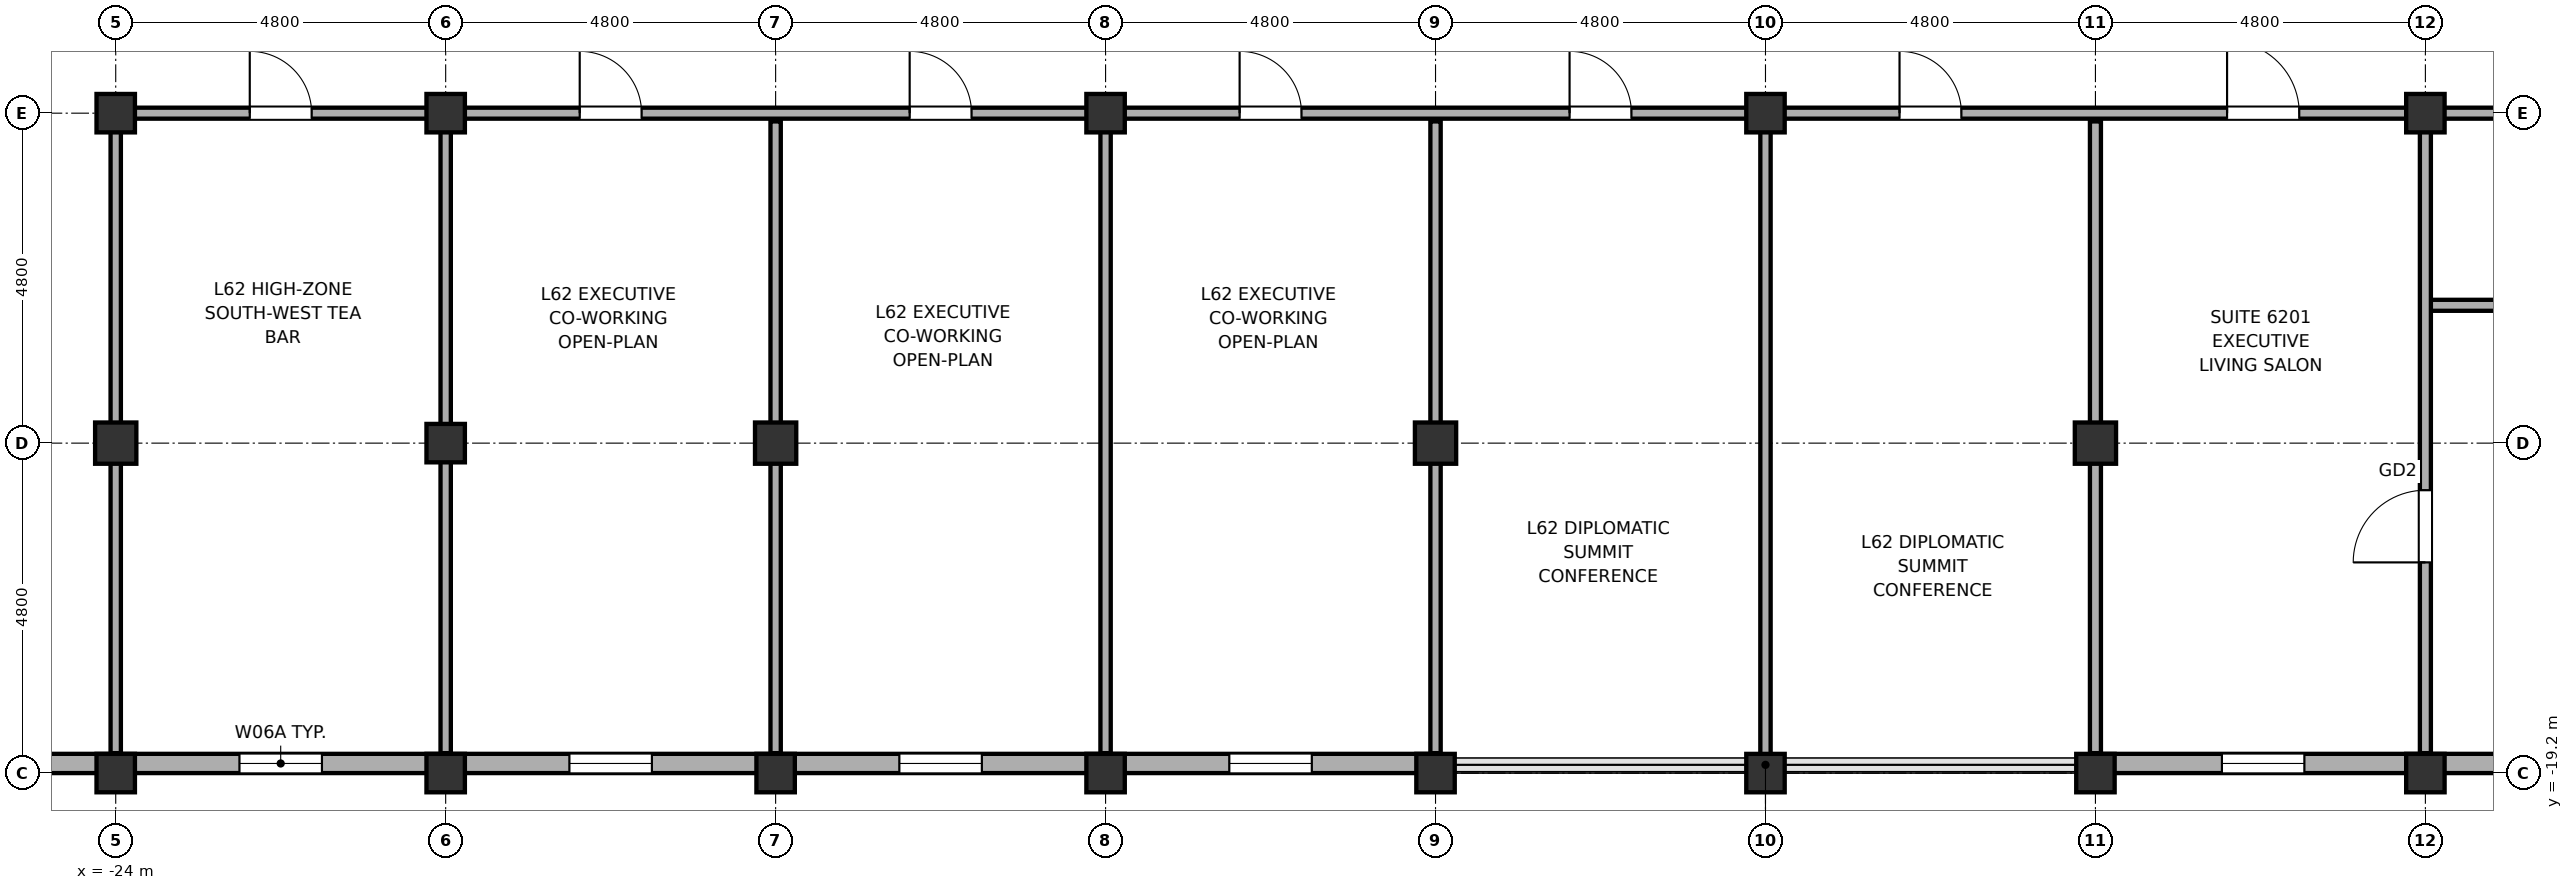
"""IFC4 building model, lengths in metres.
Left out: names, types, materials, properties, quantities, classifications, styles, units other than length and angle.
Written with IfcOpenShell. Run it as: python <this file> out.ifc"""

import sys

from ifc_helpers import new_model, si_unit, direction, frame, frame_2d, origin, origin_2d, place, context, subcontext, project, spatial, rectangle, hollow_rectangle, hollow_circle, extrude, element, fill, save


model = new_model("IFC4")
c1 = context("Model", 3, precision=1e-05, world=origin(), true_north=direction((0.0, 1.0)))
c2 = subcontext(c1, "Body", "Model", "MODEL_VIEW")
j1 = project(units=[si_unit("LENGTHUNIT", "METRE"), si_unit("PLANEANGLEUNIT", "RADIAN")], contexts=[c1])
p1 = place(None, origin())
s1 = spatial("IfcSite", under=j1, at=p1, CompositionType="ELEMENT")
p2 = place(p1, origin())
s2 = spatial("IfcBuilding", under=s1, at=p2, CompositionType="ELEMENT")
p3 = place(p2, frame((0.0, 0.0, 249.25)))
s3 = spatial("IfcBuildingStorey", under=s2, at=p3, CompositionType="ELEMENT", Elevation=249.25)
p4 = place(p3, frame((-24.0, -19.2, 0.0), z_axis=(0.0, 0.0, 1.0), x_axis=(1.0, 0.0, 0.0)))
e1 = element("IfcColumn", 1, at=p4, inside=s3, PredefinedType="COLUMN", context=c2, shape_type="SweptSolid", body=[
    extrude(hollow_circle(Radius=0.28, WallThickness=0.025, at=origin_2d()), origin(), (0.0, 0.0, 1.0), 3.85),
])
p5 = place(p3, frame((-24.0, -14.4, 0.0), z_axis=(0.0, 0.0, 1.0), x_axis=(1.0, 0.0, 0.0)))
e2 = element("IfcColumn", 2, at=p5, inside=s3, PredefinedType="COLUMN", context=c2, shape_type="SweptSolid", body=[
    extrude(hollow_rectangle(XDim=0.6, YDim=0.6, WallThickness=0.028, at=origin_2d()), origin(), (0.0, 0.0, 1.0), 3.85),
])
for number, where, z_axis, x_axis in (
    (3, (-24.0, -9.6, 0.0), (0.0, 0.0, 1.0), (1.0, 0.0, 0.0)),
    (4, (-19.2, -19.2, 0.0), (0.0, 0.0, 1.0), (1.0, 0.0, 0.0)),
    (5, (-19.2, -14.4, 0.0), (0.0, 0.0, 1.0), (1.0, 0.0, 0.0)),
    (6, (-19.2, -9.6, 0.0), (0.0, 0.0, 1.0), (1.0, 0.0, 0.0)),
    (7, (-14.4, -19.2, 0.0), (0.0, 0.0, 1.0), (1.0, 0.0, 0.0)),
):
    element("IfcColumn", number, at=place(p3, frame(where, z_axis=z_axis, x_axis=x_axis)), inside=s3, PredefinedType="COLUMN", context=c2, shape_type="SweptSolid", body=[
        extrude(hollow_circle(Radius=0.28, WallThickness=0.025, at=origin_2d()), origin(), (0.0, 0.0, 1.0), 3.85),
    ])
p6 = place(p3, frame((-14.4, -14.4, 0.0), z_axis=(0.0, 0.0, 1.0), x_axis=(1.0, 0.0, 0.0)))
e8 = element("IfcColumn", 8, at=p6, inside=s3, PredefinedType="COLUMN", context=c2, shape_type="SweptSolid", body=[
    extrude(hollow_rectangle(XDim=0.6, YDim=0.6, WallThickness=0.028, at=origin_2d()), origin(), (0.0, 0.0, 1.0), 3.85),
])
for number, where, z_axis, x_axis in (
    (9, (-9.6, -19.2, 0.0), (0.0, 0.0, 1.0), (1.0, 0.0, 0.0)),
    (10, (-9.6, -9.6, 0.0), (0.0, 0.0, 1.0), (1.0, 0.0, 0.0)),
    (11, (-4.8, -19.2, 0.0), (0.0, 0.0, 1.0), (1.0, 0.0, 0.0)),
):
    element("IfcColumn", number, at=place(p3, frame(where, z_axis=z_axis, x_axis=x_axis)), inside=s3, PredefinedType="COLUMN", context=c2, shape_type="SweptSolid", body=[
        extrude(hollow_circle(Radius=0.28, WallThickness=0.025, at=origin_2d()), origin(), (0.0, 0.0, 1.0), 3.85),
    ])
p7 = place(p3, frame((-4.8, -14.4, 0.0), z_axis=(0.0, 0.0, 1.0), x_axis=(1.0, 0.0, 0.0)))
e12 = element("IfcColumn", 12, at=p7, inside=s3, PredefinedType="COLUMN", context=c2, shape_type="SweptSolid", body=[
    extrude(hollow_rectangle(XDim=0.6, YDim=0.6, WallThickness=0.028, at=origin_2d()), origin(), (0.0, 0.0, 1.0), 3.85),
])
for number, where, z_axis, x_axis in (
    (13, (0.0, -19.2, 0.0), (0.0, 0.0, 1.0), (1.0, 0.0, 0.0)),
    (14, (0.0, -9.6, 0.0), (0.0, 0.0, 1.0), (1.0, 0.0, 0.0)),
    (15, (4.8, -19.2, 0.0), (0.0, 0.0, 1.0), (1.0, 0.0, 0.0)),
):
    element("IfcColumn", number, at=place(p3, frame(where, z_axis=z_axis, x_axis=x_axis)), inside=s3, PredefinedType="COLUMN", context=c2, shape_type="SweptSolid", body=[
        extrude(hollow_circle(Radius=0.28, WallThickness=0.025, at=origin_2d()), origin(), (0.0, 0.0, 1.0), 3.85),
    ])
p8 = place(p3, frame((4.8, -14.4, 0.0), z_axis=(0.0, 0.0, 1.0), x_axis=(1.0, 0.0, 0.0)))
e16 = element("IfcColumn", 16, at=p8, inside=s3, PredefinedType="COLUMN", context=c2, shape_type="SweptSolid", body=[
    extrude(hollow_rectangle(XDim=0.6, YDim=0.6, WallThickness=0.028, at=origin_2d()), origin(), (0.0, 0.0, 1.0), 3.85),
])
for number, where, z_axis, x_axis in (
    (17, (9.6, -19.2, 0.0), (0.0, 0.0, 1.0), (1.0, 0.0, 0.0)),
    (18, (9.6, -9.6, 0.0), (0.0, 0.0, 1.0), (1.0, 0.0, 0.0)),
):
    element("IfcColumn", number, at=place(p3, frame(where, z_axis=z_axis, x_axis=x_axis)), inside=s3, PredefinedType="COLUMN", context=c2, shape_type="SweptSolid", body=[
        extrude(hollow_circle(Radius=0.28, WallThickness=0.025, at=origin_2d()), origin(), (0.0, 0.0, 1.0), 3.85),
    ])
p9 = place(p3, frame((-30.0, -19.06, 0.0), z_axis=(0.0, 0.0, 1.0), x_axis=(1.0, 0.0, 0.0)))
e19 = element("IfcWall", 19, at=p9, inside=s3, PredefinedType="SOLIDWALL", context=c2, shape_type="SweptSolid", body=[
    extrude(rectangle(XDim=25.25, YDim=0.28, at=frame_2d((12.625, 0.0))), origin(), (0.0, 0.0, 1.0), 2.27),
])
p10 = place(p9, frame((7.8, 0.0, 0.75)))
e20 = element("IfcOpeningElement", 20, at=p10, cuts=e19, PredefinedType="OPENING", context=c2, shape_type="SweptSolid", body=[
    extrude(rectangle(XDim=1.2, YDim=1.15, at=frame_2d((0.6, 0.575))), frame((0.0, 0.155, 0.0), z_axis=(0.0, -1.0, 0.0), x_axis=(1.0, 0.0, 0.0)), (0.0, 0.0, 1.0), 0.31),
])
p11 = place(p9, frame((12.6, 0.0, 0.75)))
e21 = element("IfcOpeningElement", 21, at=p11, cuts=e19, PredefinedType="OPENING", context=c2, shape_type="SweptSolid", body=[
    extrude(rectangle(XDim=1.2, YDim=1.15, at=frame_2d((0.6, 0.575))), frame((0.0, 0.155, 0.0), z_axis=(0.0, -1.0, 0.0), x_axis=(1.0, 0.0, 0.0)), (0.0, 0.0, 1.0), 0.31),
])
p12 = place(p9, frame((17.4, 0.0, 0.75)))
e22 = element("IfcOpeningElement", 22, at=p12, cuts=e19, PredefinedType="OPENING", context=c2, shape_type="SweptSolid", body=[
    extrude(rectangle(XDim=1.2, YDim=1.15, at=frame_2d((0.6, 0.575))), frame((0.0, 0.155, 0.0), z_axis=(0.0, -1.0, 0.0), x_axis=(1.0, 0.0, 0.0)), (0.0, 0.0, 1.0), 0.31),
])
p13 = place(p9, frame((22.2, 0.0, 0.75)))
e23 = element("IfcOpeningElement", 23, at=p13, cuts=e19, PredefinedType="OPENING", context=c2, shape_type="SweptSolid", body=[
    extrude(rectangle(XDim=1.2, YDim=1.15, at=frame_2d((0.6, 0.575))), frame((0.0, 0.155, 0.0), z_axis=(0.0, -1.0, 0.0), x_axis=(1.0, 0.0, 0.0)), (0.0, 0.0, 1.0), 0.31),
])
p14 = place(p3, frame((4.75, -19.06, 0.0), z_axis=(0.0, 0.0, 1.0), x_axis=(1.0, 0.0, 0.0)))
e24 = element("IfcWall", 24, at=p14, inside=s3, PredefinedType="SOLIDWALL", context=c2, shape_type="SweptSolid", body=[
    extrude(rectangle(XDim=20.45, YDim=0.28, at=frame_2d((10.225, 0.0))), origin(), (0.0, 0.0, 1.0), 2.27),
])
p15 = place(p14, frame((1.89, 0.0, 0.75)))
e25 = element("IfcOpeningElement", 25, at=p15, cuts=e24, PredefinedType="OPENING", context=c2, shape_type="SweptSolid", body=[
    extrude(rectangle(XDim=1.2, YDim=1.15, at=frame_2d((0.6, 0.575))), frame((0.0, 0.155, 0.0), z_axis=(0.0, -1.0, 0.0), x_axis=(1.0, 0.0, 0.0)), (0.0, 0.0, 1.0), 0.31),
])
p16 = place(p14, frame((6.61, 0.0, 0.75)))
e26 = element("IfcOpeningElement", 26, at=p16, cuts=e24, PredefinedType="OPENING", context=c2, shape_type="SweptSolid", body=[
    extrude(rectangle(XDim=1.2, YDim=1.15, at=frame_2d((0.6, 0.575))), frame((0.0, 0.155, 0.0), z_axis=(0.0, -1.0, 0.0), x_axis=(1.0, 0.0, 0.0)), (0.0, 0.0, 1.0), 0.31),
])
p17 = place(p14, frame((11.45, 0.0, 0.75)))
e27 = element("IfcOpeningElement", 27, at=p17, cuts=e24, PredefinedType="OPENING", context=c2, shape_type="SweptSolid", body=[
    extrude(rectangle(XDim=1.2, YDim=1.15, at=frame_2d((0.6, 0.575))), frame((0.0, 0.155, 0.0), z_axis=(0.0, -1.0, 0.0), x_axis=(1.0, 0.0, 0.0)), (0.0, 0.0, 1.0), 0.31),
])
p18 = place(p3, frame((9.6, -12.395, 0.0), z_axis=(0.0, 0.0, 1.0), x_axis=(1.0, 0.0, 0.0)))
e28 = element("IfcWall", 28, at=p18, inside=s3, PredefinedType="PARTITIONING", context=c2, shape_type="SweptSolid", body=[
    extrude(rectangle(XDim=7.01, YDim=0.16, at=frame_2d((3.505, 0.0))), origin(), (0.0, 0.0, 1.0), 3.12),
])
p19 = place(p18, frame((1.93, 0.0, 0.0)))
e29 = element("IfcOpeningElement", 29, at=p19, cuts=e28, PredefinedType="OPENING", context=c2, shape_type="SweptSolid", body=[
    extrude(rectangle(XDim=0.86, YDim=2.1, at=frame_2d((0.43, 1.05))), frame((0.0, 0.095, 0.0), z_axis=(0.0, -1.0, 0.0), x_axis=(1.0, 0.0, 0.0)), (0.0, 0.0, 1.0), 0.19),
])
p20 = place(p3, frame((-23.92, -9.6, 0.0), z_axis=(0.0, 0.0, 1.0), x_axis=(1.0, 0.0, 0.0)))
e30 = element("IfcWall", 30, at=p20, inside=s3, PredefinedType="PARTITIONING", context=c2, shape_type="SweptSolid", body=[
    extrude(rectangle(XDim=47.84, YDim=0.16, at=frame_2d((23.92, 0.0))), origin(), (0.0, 0.0, 1.0), 2.27),
])
p21 = place(p20, frame((1.87, 0.0, 0.0)))
e31 = element("IfcOpeningElement", 31, at=p21, cuts=e30, PredefinedType="OPENING", context=c2, shape_type="SweptSolid", body=[
    extrude(rectangle(XDim=0.9, YDim=2.1, at=frame_2d((0.45, 1.05))), frame((0.0, 0.095, 0.0), z_axis=(0.0, -1.0, 0.0), x_axis=(1.0, 0.0, 0.0)), (0.0, 0.0, 1.0), 0.19),
])
p22 = place(p20, frame((45.07, 0.0, 0.0)))
e32 = element("IfcOpeningElement", 32, at=p22, cuts=e30, PredefinedType="OPENING", context=c2, shape_type="SweptSolid", body=[
    extrude(rectangle(XDim=0.9, YDim=2.1, at=frame_2d((0.45, 1.05))), frame((0.0, 0.095, 0.0), z_axis=(0.0, -1.0, 0.0), x_axis=(1.0, 0.0, 0.0)), (0.0, 0.0, 1.0), 0.19),
])
p23 = place(p20, frame((6.67, 0.0, 0.0)))
e33 = element("IfcOpeningElement", 33, at=p23, cuts=e30, PredefinedType="OPENING", context=c2, shape_type="SweptSolid", body=[
    extrude(rectangle(XDim=0.9, YDim=2.1, at=frame_2d((0.45, 1.05))), frame((0.0, 0.095, 0.0), z_axis=(0.0, -1.0, 0.0), x_axis=(1.0, 0.0, 0.0)), (0.0, 0.0, 1.0), 0.19),
])
p24 = place(p20, frame((11.47, 0.0, 0.0)))
e34 = element("IfcOpeningElement", 34, at=p24, cuts=e30, PredefinedType="OPENING", context=c2, shape_type="SweptSolid", body=[
    extrude(rectangle(XDim=0.9, YDim=2.1, at=frame_2d((0.45, 1.05))), frame((0.0, 0.095, 0.0), z_axis=(0.0, -1.0, 0.0), x_axis=(1.0, 0.0, 0.0)), (0.0, 0.0, 1.0), 0.19),
])
p25 = place(p20, frame((16.27, 0.0, 0.0)))
e35 = element("IfcOpeningElement", 35, at=p25, cuts=e30, PredefinedType="OPENING", context=c2, shape_type="SweptSolid", body=[
    extrude(rectangle(XDim=0.9, YDim=2.1, at=frame_2d((0.45, 1.05))), frame((0.0, 0.095, 0.0), z_axis=(0.0, -1.0, 0.0), x_axis=(1.0, 0.0, 0.0)), (0.0, 0.0, 1.0), 0.19),
])
p26 = place(p20, frame((21.07, 0.0, 0.0)))
e36 = element("IfcOpeningElement", 36, at=p26, cuts=e30, PredefinedType="OPENING", context=c2, shape_type="SweptSolid", body=[
    extrude(rectangle(XDim=0.9, YDim=2.1, at=frame_2d((0.45, 1.05))), frame((0.0, 0.095, 0.0), z_axis=(0.0, -1.0, 0.0), x_axis=(1.0, 0.0, 0.0)), (0.0, 0.0, 1.0), 0.19),
])
p27 = place(p20, frame((25.87, 0.0, 0.0)))
e37 = element("IfcOpeningElement", 37, at=p27, cuts=e30, PredefinedType="OPENING", context=c2, shape_type="SweptSolid", body=[
    extrude(rectangle(XDim=0.9, YDim=2.1, at=frame_2d((0.45, 1.05))), frame((0.0, 0.095, 0.0), z_axis=(0.0, -1.0, 0.0), x_axis=(1.0, 0.0, 0.0)), (0.0, 0.0, 1.0), 0.19),
])
p28 = place(p20, frame((30.635, 0.0, 0.0)))
e38 = element("IfcOpeningElement", 38, at=p28, cuts=e30, PredefinedType="OPENING", context=c2, shape_type="SweptSolid", body=[
    extrude(rectangle(XDim=1.05, YDim=2.2, at=frame_2d((0.525, 1.1))), frame((0.0, 0.095, 0.0), z_axis=(0.0, -1.0, 0.0), x_axis=(1.0, 0.0, 0.0)), (0.0, 0.0, 1.0), 0.19),
])
p29 = place(p20, frame((40.83, 0.0, 0.0)))
e39 = element("IfcOpeningElement", 39, at=p29, cuts=e30, PredefinedType="OPENING", context=c2, shape_type="SweptSolid", body=[
    extrude(rectangle(XDim=0.92, YDim=2.15, at=frame_2d((0.46, 1.075))), frame((0.0, 0.095, 0.0), z_axis=(0.0, -1.0, 0.0), x_axis=(1.0, 0.0, 0.0)), (0.0, 0.0, 1.0), 0.19),
])
for number, where, z_axis, x_axis in (
    (40, (-24.0, -18.91, 0.0), (0.0, 0.0, 1.0), (0.0, 1.0, 0.0)),
    (41, (-19.2, -18.91, 0.0), (0.0, 0.0, 1.0), (0.0, 1.0, 0.0)),
    (42, (-14.4, -18.91, 0.0), (0.0, 0.0, 1.0), (0.0, 1.0, 0.0)),
    (43, (-9.6, -18.91, 0.0), (0.0, 0.0, 1.0), (0.0, 1.0, 0.0)),
    (44, (-4.8, -18.91, 0.0), (0.0, 0.0, 1.0), (0.0, 1.0, 0.0)),
):
    element("IfcWall", number, at=place(p3, frame(where, z_axis=z_axis, x_axis=x_axis)), inside=s3, PredefinedType="PARTITIONING", context=c2, shape_type="SweptSolid", body=[
        extrude(rectangle(XDim=9.19, YDim=0.15, at=frame_2d((4.595, 0.0))), origin(), (0.0, 0.0, 1.0), 2.27),
    ])
p30 = place(p3, frame((0.0, -18.995, 0.0), z_axis=(0.0, 0.0, 1.0), x_axis=(0.0, 1.0, 0.0)))
e45 = element("IfcWall", 45, at=p30, inside=s3, PredefinedType="PARTITIONING", context=c2, shape_type="SweptSolid", body=[
    extrude(rectangle(XDim=9.275, YDim=0.15, at=frame_2d((4.638, 0.0))), origin(), (0.0, 0.0, 1.0), 2.27),
])
p31 = place(p3, frame((4.8, -18.91, 0.0), z_axis=(0.0, 0.0, 1.0), x_axis=(0.0, 1.0, 0.0)))
e46 = element("IfcWall", 46, at=p31, inside=s3, PredefinedType="PARTITIONING", context=c2, shape_type="SweptSolid", body=[
    extrude(rectangle(XDim=9.19, YDim=0.16, at=frame_2d((4.595, 0.0))), origin(), (0.0, 0.0, 1.0), 2.27),
])
p32 = place(p3, frame((9.6, -18.91, 0.0), z_axis=(0.0, 0.0, 1.0), x_axis=(0.0, 1.0, 0.0)))
e47 = element("IfcWall", 47, at=p32, inside=s3, PredefinedType="PARTITIONING", context=c2, shape_type="SweptSolid", body=[
    extrude(rectangle(XDim=9.19, YDim=0.16, at=frame_2d((4.595, 0.0))), origin(), (0.0, 0.0, 1.0), 2.27),
])
p33 = place(p32, frame((2.775, 0.0, 0.0)))
e48 = element("IfcOpeningElement", 48, at=p33, cuts=e47, PredefinedType="OPENING", context=c2, shape_type="SweptSolid", body=[
    extrude(rectangle(XDim=1.05, YDim=2.2, at=frame_2d((0.525, 1.1))), frame((0.0, 0.095, 0.0), z_axis=(0.0, -1.0, 0.0), x_axis=(1.0, 0.0, 0.0)), (0.0, 0.0, 1.0), 0.19),
])
p34 = place(p10, origin())
e49 = element("IfcWindow", 49, at=p34, inside=s3, PartitioningType="SINGLE_PANEL", PredefinedType="WINDOW", context=c2, shape_type="SweptSolid", body=[
    extrude(rectangle(XDim=1.2, YDim=1.15, at=frame_2d((0.6, 0.575))), frame((0.0, 0.03, 0.0), z_axis=(0.0, -1.0, 0.0), x_axis=(1.0, 0.0, 0.0)), (0.0, 0.0, 1.0), 0.06),
])
fill(e20, e49)
p35 = place(p11, origin())
e50 = element("IfcWindow", 50, at=p35, inside=s3, PartitioningType="SINGLE_PANEL", PredefinedType="WINDOW", context=c2, shape_type="SweptSolid", body=[
    extrude(rectangle(XDim=1.2, YDim=1.15, at=frame_2d((0.6, 0.575))), frame((0.0, 0.03, 0.0), z_axis=(0.0, -1.0, 0.0), x_axis=(1.0, 0.0, 0.0)), (0.0, 0.0, 1.0), 0.06),
])
fill(e21, e50)
p36 = place(p12, origin())
e51 = element("IfcWindow", 51, at=p36, inside=s3, PartitioningType="SINGLE_PANEL", PredefinedType="WINDOW", context=c2, shape_type="SweptSolid", body=[
    extrude(rectangle(XDim=1.2, YDim=1.15, at=frame_2d((0.6, 0.575))), frame((0.0, 0.03, 0.0), z_axis=(0.0, -1.0, 0.0), x_axis=(1.0, 0.0, 0.0)), (0.0, 0.0, 1.0), 0.06),
])
fill(e22, e51)
p37 = place(p13, origin())
e52 = element("IfcWindow", 52, at=p37, inside=s3, PartitioningType="SINGLE_PANEL", PredefinedType="WINDOW", context=c2, shape_type="SweptSolid", body=[
    extrude(rectangle(XDim=1.2, YDim=1.15, at=frame_2d((0.6, 0.575))), frame((0.0, 0.03, 0.0), z_axis=(0.0, -1.0, 0.0), x_axis=(1.0, 0.0, 0.0)), (0.0, 0.0, 1.0), 0.06),
])
fill(e23, e52)
p38 = place(p15, origin())
e53 = element("IfcWindow", 53, at=p38, inside=s3, PartitioningType="SINGLE_PANEL", PredefinedType="WINDOW", context=c2, shape_type="SweptSolid", body=[
    extrude(rectangle(XDim=1.2, YDim=1.15, at=frame_2d((0.6, 0.575))), frame((0.0, 0.03, 0.0), z_axis=(0.0, -1.0, 0.0), x_axis=(1.0, 0.0, 0.0)), (0.0, 0.0, 1.0), 0.06),
])
fill(e25, e53)
p39 = place(p21, origin())
e54 = element("IfcDoor", 54, at=p39, inside=s3, OperationType="SINGLE_SWING_RIGHT", PredefinedType="DOOR", context=c2, shape_type="SweptSolid", body=[
    extrude(rectangle(XDim=0.9, YDim=2.1, at=frame_2d((0.45, 1.05))), frame((0.0, 0.025, 0.0), z_axis=(0.0, -1.0, 0.0), x_axis=(1.0, 0.0, 0.0)), (0.0, 0.0, 1.0), 0.05),
])
fill(e31, e54)
p40 = place(p23, origin())
e55 = element("IfcDoor", 55, at=p40, inside=s3, OperationType="SINGLE_SWING_RIGHT", PredefinedType="DOOR", context=c2, shape_type="SweptSolid", body=[
    extrude(rectangle(XDim=0.9, YDim=2.1, at=frame_2d((0.45, 1.05))), frame((0.0, 0.025, 0.0), z_axis=(0.0, -1.0, 0.0), x_axis=(1.0, 0.0, 0.0)), (0.0, 0.0, 1.0), 0.05),
])
fill(e33, e55)
p41 = place(p24, origin())
e56 = element("IfcDoor", 56, at=p41, inside=s3, OperationType="SINGLE_SWING_RIGHT", PredefinedType="DOOR", context=c2, shape_type="SweptSolid", body=[
    extrude(rectangle(XDim=0.9, YDim=2.1, at=frame_2d((0.45, 1.05))), frame((0.0, 0.025, 0.0), z_axis=(0.0, -1.0, 0.0), x_axis=(1.0, 0.0, 0.0)), (0.0, 0.0, 1.0), 0.05),
])
fill(e34, e56)
p42 = place(p25, origin())
e57 = element("IfcDoor", 57, at=p42, inside=s3, OperationType="SINGLE_SWING_LEFT", PredefinedType="DOOR", context=c2, shape_type="SweptSolid", body=[
    extrude(rectangle(XDim=0.9, YDim=2.1, at=frame_2d((0.45, 1.05))), frame((0.0, 0.025, 0.0), z_axis=(0.0, -1.0, 0.0), x_axis=(1.0, 0.0, 0.0)), (0.0, 0.0, 1.0), 0.05),
])
fill(e35, e57)
p43 = place(p26, origin())
e58 = element("IfcDoor", 58, at=p43, inside=s3, OperationType="SINGLE_SWING_LEFT", PredefinedType="DOOR", context=c2, shape_type="SweptSolid", body=[
    extrude(rectangle(XDim=0.9, YDim=2.1, at=frame_2d((0.45, 1.05))), frame((0.0, 0.025, 0.0), z_axis=(0.0, -1.0, 0.0), x_axis=(1.0, 0.0, 0.0)), (0.0, 0.0, 1.0), 0.05),
])
fill(e36, e58)
p44 = place(p27, origin())
e59 = element("IfcDoor", 59, at=p44, inside=s3, OperationType="SINGLE_SWING_LEFT", PredefinedType="DOOR", context=c2, shape_type="SweptSolid", body=[
    extrude(rectangle(XDim=0.9, YDim=2.1, at=frame_2d((0.45, 1.05))), frame((0.0, 0.025, 0.0), z_axis=(0.0, -1.0, 0.0), x_axis=(1.0, 0.0, 0.0)), (0.0, 0.0, 1.0), 0.05),
])
fill(e37, e59)
p45 = place(p28, origin())
e60 = element("IfcDoor", 60, at=p45, inside=s3, OperationType="SINGLE_SWING_LEFT", PredefinedType="DOOR", context=c2, shape_type="SweptSolid", body=[
    extrude(rectangle(XDim=1.05, YDim=2.2, at=frame_2d((0.525, 1.1))), frame((0.0, 0.025, 0.0), z_axis=(0.0, -1.0, 0.0), x_axis=(1.0, 0.0, 0.0)), (0.0, 0.0, 1.0), 0.05),
])
fill(e38, e60)
p46 = place(p33, origin())
e61 = element("IfcDoor", 61, at=p46, inside=s3, OperationType="SINGLE_SWING_LEFT", PredefinedType="DOOR", context=c2, shape_type="SweptSolid", body=[
    extrude(rectangle(XDim=1.05, YDim=2.2, at=frame_2d((0.525, 1.1))), frame((0.0, 0.025, 0.0), z_axis=(0.0, -1.0, 0.0), x_axis=(1.0, 0.0, 0.0)), (0.0, 0.0, 1.0), 0.05),
])
fill(e48, e61)
save(model, sys.argv[1])
